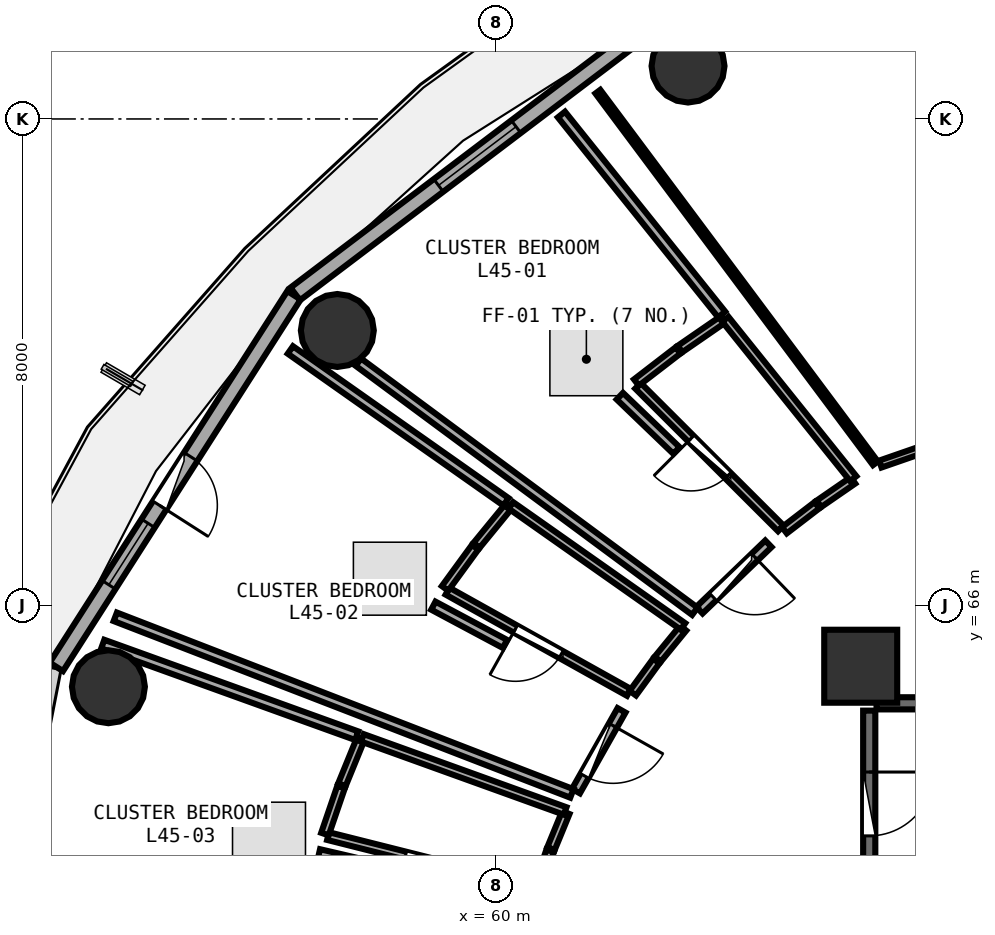
"""IFC4 building model, lengths in metres.
Left out: names, types, materials, properties, quantities, classifications, styles, units other than length and angle.
Written with IfcOpenShell. Run it as: python <this file> out.ifc"""

import sys

from ifc_helpers import new_model, si_unit, direction, frame, frame_2d, origin, origin_2d, place, context, subcontext, project, spatial, rectangle, circle, extrude, element, fill, save


model = new_model("IFC4")
c1 = context("Model", 3, precision=1e-05, world=origin(), true_north=direction((0.0, 1.0)))
c2 = subcontext(c1, "Body", "Model", "MODEL_VIEW")
j1 = project(units=[si_unit("LENGTHUNIT", "METRE"), si_unit("PLANEANGLEUNIT", "RADIAN")], contexts=[c1])
p1 = place(None, origin())
s1 = spatial("IfcSite", under=j1, at=p1, CompositionType="ELEMENT")
p2 = place(p1, origin())
s2 = spatial("IfcBuilding", under=s1, at=p2, CompositionType="ELEMENT")
p3 = place(p2, frame((0.0, 0.0, 176.85)))
s3 = spatial("IfcBuildingStorey", under=s2, at=p3, CompositionType="ELEMENT", Elevation=176.85)
p4 = place(p3, frame((66.0, 65.0, 0.0), z_axis=(0.0, 0.0, 1.0), x_axis=(1.0, 0.0, 0.0)))
e1 = element("IfcColumn", 1, at=p4, inside=s3, PredefinedType="PILASTER", context=c2, shape_type="SweptSolid", body=[
    extrude(rectangle(XDim=1.2, YDim=1.2, at=origin_2d()), origin(), (0.0, 0.0, 1.0), 3.75),
])
for number, where, z_axis, x_axis in (
    (2, (63.16, 74.87, 0.0), (0.0, 0.0, 1.0), (1.0, 0.0, 0.0)),
    (3, (57.392, 70.521, 0.0), (0.0, 0.0, 1.0), (1.0, 0.0, 0.0)),
    (4, (53.627, 64.663, 0.0), (0.0, 0.0, 1.0), (1.0, 0.0, 0.0)),
):
    element("IfcColumn", number, at=place(p3, frame(where, z_axis=z_axis, x_axis=x_axis)), inside=s3, PredefinedType="COLUMN", context=c2, shape_type="SweptSolid", body=[
        extrude(circle(Radius=0.6, at=origin_2d()), origin(), (0.0, 0.0, 1.0), 3.75),
    ])
p5 = place(p3, frame((62.688, 75.658, 0.0), z_axis=(0.0, 0.0, 1.0), x_axis=(-0.797163719609, -0.603763202042, 0.0)))
e5 = element("IfcWall", 5, at=p5, inside=s3, PredefinedType="SOLIDWALL", context=c2, shape_type="SweptSolid", body=[
    extrude(rectangle(XDim=7.512, YDim=0.26, at=frame_2d((3.756, 0.0))), origin(), (0.0, 0.0, 1.0), 3.475),
])
p6 = place(p5, frame((2.956, 0.0, 0.85)))
e6 = element("IfcOpeningElement", 6, at=p6, cuts=e5, PredefinedType="OPENING", context=c2, shape_type="SweptSolid", body=[
    extrude(rectangle(XDim=1.6, YDim=1.45, at=frame_2d((0.8, 0.725))), frame((0.0, 0.14, 0.0), z_axis=(0.0, -1.0, 0.0), x_axis=(1.0, 0.0, 0.0)), (0.0, 0.0, 1.0), 0.28),
])
p7 = place(p3, frame((56.679, 71.1, 0.0), z_axis=(0.0, 0.0, 1.0), x_axis=(-0.538801521808, -0.842432739213, 0.0)))
e7 = element("IfcWall", 7, at=p7, inside=s3, PredefinedType="SOLIDWALL", context=c2, shape_type="SweptSolid", body=[
    extrude(rectangle(XDim=7.253, YDim=0.26, at=frame_2d((3.627, 0.0))), origin(), (0.0, 0.0, 1.0), 3.475),
])
p8 = place(p7, frame((3.152, 0.0, 0.0)))
e8 = element("IfcOpeningElement", 8, at=p8, cuts=e7, PredefinedType="OPENING", context=c2, shape_type="SweptSolid", body=[
    extrude(rectangle(XDim=0.95, YDim=2.1, at=frame_2d((0.475, 1.05))), frame((0.0, 0.14, 0.0), z_axis=(0.0, -1.0, 0.0), x_axis=(1.0, 0.0, 0.0)), (0.0, 0.0, 1.0), 0.28),
])
p9 = place(p7, frame((4.452, 0.0, 0.85)))
e9 = element("IfcOpeningElement", 9, at=p9, cuts=e7, PredefinedType="OPENING", context=c2, shape_type="SweptSolid", body=[
    extrude(rectangle(XDim=1.2, YDim=1.45, at=frame_2d((0.6, 0.725))), frame((0.0, 0.14, 0.0), z_axis=(0.0, -1.0, 0.0), x_axis=(1.0, 0.0, 0.0)), (0.0, 0.0, 1.0), 0.28),
])
p10 = place(p3, frame((73.42, 64.39, 0.0), z_axis=(0.0, 0.0, 1.0), x_axis=(-1.0, 0.0, 0.0)))
e10 = element("IfcWall", 10, at=p10, inside=s3, PredefinedType="SHEAR", context=c2, shape_type="SweptSolid", body=[
    extrude(rectangle(XDim=7.16, YDim=0.2, at=frame_2d((3.58, 0.0))), origin(), (0.0, 0.0, 1.0), 3.49),
])
p11 = place(p3, frame((66.14, 64.27, 0.0), z_axis=(0.0, 0.0, 1.0), x_axis=(0.0, -1.0, 0.0)))
e11 = element("IfcWall", 11, at=p11, inside=s3, PredefinedType="SHEAR", context=c2, shape_type="SweptSolid", body=[
    extrude(rectangle(XDim=3.07, YDim=0.2, at=frame_2d((1.535, 0.0))), origin(), (0.0, 0.0, 1.0), 3.49),
])
p12 = place(p11, frame((1.01, 0.0, 0.0)))
e12 = element("IfcOpeningElement", 12, at=p12, cuts=e11, PredefinedType="OPENING", context=c2, shape_type="SweptSolid", body=[
    extrude(rectangle(XDim=1.05, YDim=2.1, at=frame_2d((0.525, 1.05))), frame((0.0, 0.11, 0.0), z_axis=(0.0, -1.0, 0.0), x_axis=(1.0, 0.0, 0.0)), (0.0, 0.0, 1.0), 0.22),
])
p13 = place(p3, frame((71.958, 70.281, 0.0), z_axis=(0.0, 0.0, 1.0), x_axis=(-0.944685464341, -0.327977702692, 0.0)))
e13 = element("IfcWall", 13, at=p13, inside=s3, PredefinedType="PARTITIONING", context=c2, shape_type="SweptSolid", body=[
    extrude(rectangle(XDim=5.966, YDim=0.12, at=frame_2d((2.983, 0.0))), origin(), (0.0, 0.0, 1.0), 2.975),
])
p14 = place(p13, frame((2.533, 0.0, 0.0)))
e14 = element("IfcOpeningElement", 14, at=p14, cuts=e13, PredefinedType="OPENING", context=c2, shape_type="SweptSolid", body=[
    extrude(rectangle(XDim=0.9, YDim=2.08, at=frame_2d((0.45, 1.04))), frame((0.0, 0.07, 0.0), z_axis=(0.0, -1.0, 0.0), x_axis=(1.0, 0.0, 0.0)), (0.0, 0.0, 1.0), 0.14),
])
p15 = place(p3, frame((64.687, 67.266, 0.0), z_axis=(0.0, 0.0, 1.0), x_axis=(-0.707694933746, 0.706518139011, 0.0)))
e15 = element("IfcWall", 15, at=p15, inside=s3, PredefinedType="PLUMBINGWALL", context=c2, shape_type="SweptSolid", body=[
    extrude(rectangle(XDim=3.319, YDim=0.13, at=frame_2d((1.66, 0.0))), origin(), (0.0, 0.0, 1.0), 3.175),
])
p16 = place(p15, frame((1.23, 0.0, 0.0)))
e16 = element("IfcOpeningElement", 16, at=p16, cuts=e15, PredefinedType="OPENING", context=c2, shape_type="SweptSolid", body=[
    extrude(rectangle(XDim=0.86, YDim=2.05, at=frame_2d((0.43, 1.025))), frame((0.0, 0.075, 0.0), z_axis=(0.0, -1.0, 0.0), x_axis=(1.0, 0.0, 0.0)), (0.0, 0.0, 1.0), 0.15),
])
p17 = place(p3, frame((64.482, 67.013, 0.0), z_axis=(0.0, 0.0, 1.0), x_axis=(-0.720543985977, -0.693409232901, 0.0)))
e17 = element("IfcWall", 17, at=p17, inside=s3, PredefinedType="PARTITIONING", context=c2, shape_type="SweptSolid", body=[
    extrude(rectangle(XDim=1.574, YDim=0.15, at=frame_2d((0.787, 0.0))), origin(), (0.0, 0.0, 1.0), 2.975),
])
p18 = place(p17, frame((0.312, 0.0, 0.0)))
e18 = element("IfcOpeningElement", 18, at=p18, cuts=e17, PredefinedType="OPENING", context=c2, shape_type="SweptSolid", body=[
    extrude(rectangle(XDim=0.95, YDim=2.08, at=frame_2d((0.475, 1.04))), frame((0.0, 0.085, 0.0), z_axis=(0.0, -1.0, 0.0), x_axis=(1.0, 0.0, 0.0)), (0.0, 0.0, 1.0), 0.17),
])
p19 = place(p3, frame((62.188, 64.57, 0.0), z_axis=(0.0, 0.0, 1.0), x_axis=(-0.873255694646, 0.487262241271, 0.0)))
e19 = element("IfcWall", 19, at=p19, inside=s3, PredefinedType="PLUMBINGWALL", context=c2, shape_type="SweptSolid", body=[
    extrude(rectangle(XDim=3.416, YDim=0.13, at=frame_2d((1.708, 0.0))), origin(), (0.0, 0.0, 1.0), 2.975),
])
p20 = place(p19, frame((1.278, 0.0, 0.0)))
e20 = element("IfcOpeningElement", 20, at=p20, cuts=e19, PredefinedType="OPENING", context=c2, shape_type="SweptSolid", body=[
    extrude(rectangle(XDim=0.86, YDim=2.05, at=frame_2d((0.43, 1.025))), frame((0.0, 0.075, 0.0), z_axis=(0.0, -1.0, 0.0), x_axis=(1.0, 0.0, 0.0)), (0.0, 0.0, 1.0), 0.15),
])
p21 = place(p3, frame((62.066, 64.275, 0.0), z_axis=(0.0, 0.0, 1.0), x_axis=(-0.491582624537, -0.870830938388, 0.0)))
e21 = element("IfcWall", 21, at=p21, inside=s3, PredefinedType="PARTITIONING", context=c2, shape_type="SweptSolid", body=[
    extrude(rectangle(XDim=1.526, YDim=0.15, at=frame_2d((0.763, 0.0))), origin(), (0.0, 0.0, 1.0), 3.235),
])
p22 = place(p21, frame((0.288, 0.0, 0.0)))
e22 = element("IfcOpeningElement", 22, at=p22, cuts=e21, PredefinedType="OPENING", context=c2, shape_type="SweptSolid", body=[
    extrude(rectangle(XDim=0.95, YDim=2.08, at=frame_2d((0.475, 1.04))), frame((0.0, 0.085, 0.0), z_axis=(0.0, -1.0, 0.0), x_axis=(1.0, 0.0, 0.0)), (0.0, 0.0, 1.0), 0.17),
])
p23 = place(p3, frame((60.621, 61.356, 0.0), z_axis=(0.0, 0.0, 1.0), x_axis=(-0.969774737706, 0.244001963326, 0.0)))
e23 = element("IfcWall", 23, at=p23, inside=s3, PredefinedType="PLUMBINGWALL", context=c2, shape_type="SweptSolid", body=[
    extrude(rectangle(XDim=3.486, YDim=0.13, at=frame_2d((1.743, 0.0))), origin(), (0.0, 0.0, 1.0), 3.175),
])
p24 = place(p23, frame((1.313, 0.0, 0.0)))
e24 = element("IfcOpeningElement", 24, at=p24, cuts=e23, PredefinedType="OPENING", context=c2, shape_type="SweptSolid", body=[
    extrude(rectangle(XDim=0.86, YDim=2.05, at=frame_2d((0.43, 1.025))), frame((0.0, 0.075, 0.0), z_axis=(0.0, -1.0, 0.0), x_axis=(1.0, 0.0, 0.0)), (0.0, 0.0, 1.0), 0.15),
])
p25 = place(p3, frame((66.242, 68.337, 0.0), z_axis=(0.0, 0.0, 1.0), x_axis=(-0.598416617992, 0.801185091793, 0.0)))
e25 = element("IfcWall", 25, at=p25, inside=s3, PredefinedType="PARTITIONING", context=c2, shape_type="SweptSolid", body=[
    extrude(rectangle(XDim=7.629, YDim=0.1, at=frame_2d((3.814, 0.0))), origin(), (0.0, 0.0, 1.0), 2.975),
])
p26 = place(p3, frame((65.874, 68.058, 0.0), z_axis=(0.0, 0.0, 1.0), x_axis=(-0.823224352539, -0.567716183834, 0.0)))
e26 = element("IfcWall", 26, at=p26, inside=s3, PredefinedType="PLUMBINGWALL", context=c2, shape_type="SweptSolid", body=[
    extrude(rectangle(XDim=0.68, YDim=0.13, at=frame_2d((0.34, 0.0))), origin(), (0.0, 0.0, 1.0), 2.975),
])
p27 = place(p3, frame((65.281, 67.648, 0.0), z_axis=(0.0, 0.0, 1.0), x_axis=(-0.793187600036, -0.608977365055, 0.0)))
e27 = element("IfcWall", 27, at=p27, inside=s3, PredefinedType="PLUMBINGWALL", context=c2, shape_type="SweptSolid", body=[
    extrude(rectangle(XDim=0.676, YDim=0.13, at=frame_2d((0.338, 0.0))), origin(), (0.0, 0.0, 1.0), 2.975),
])
p28 = place(p3, frame((62.311, 69.666, 0.0), z_axis=(0.0, 0.0, 1.0), x_axis=(0.792382565467, 0.610024483069, 0.0)))
e28 = element("IfcWall", 28, at=p28, inside=s3, PredefinedType="PLUMBINGWALL", context=c2, shape_type="SweptSolid", body=[
    extrude(rectangle(XDim=0.865, YDim=0.13, at=frame_2d((0.432, 0.0))), origin(), (0.0, 0.0, 1.0), 3.48),
])
p29 = place(p3, frame((63.029, 70.217, 0.0), z_axis=(0.0, 0.0, 1.0), x_axis=(0.823353055732, 0.567529510789, 0.0)))
e29 = element("IfcWall", 29, at=p29, inside=s3, PredefinedType="PLUMBINGWALL", context=c2, shape_type="SweptSolid", body=[
    extrude(rectangle(XDim=0.869, YDim=0.13, at=frame_2d((0.435, 0.0))), origin(), (0.0, 0.0, 1.0), 3.175),
])
p30 = place(p3, frame((63.773, 70.706, 0.0), z_axis=(0.0, 0.0, 1.0), x_axis=(0.625916574892, -0.779890018704, 0.0)))
e30 = element("IfcWall", 30, at=p30, inside=s3, PredefinedType="PLUMBINGWALL", context=c2, shape_type="SweptSolid", body=[
    extrude(rectangle(XDim=3.362, YDim=0.13, at=frame_2d((1.681, 0.0))), origin(), (0.0, 0.0, 1.0), 2.975),
])
p31 = place(p3, frame((63.272, 65.904, 0.0), z_axis=(0.0, 0.0, 1.0), x_axis=(-0.803728632682, 0.594996037808, 0.0)))
e31 = element("IfcWall", 31, at=p31, inside=s3, PredefinedType="PARTITIONING", context=c2, shape_type="SweptSolid", body=[
    extrude(rectangle(XDim=6.886, YDim=0.15, at=frame_2d((3.443, 0.0))), origin(), (0.0, 0.0, 1.0), 3.175),
])
p32 = place(p3, frame((61.078, 74.073, 0.0), z_axis=(0.0, 0.0, 1.0), x_axis=(0.62540850869, -0.780297505608, 0.0)))
e32 = element("IfcWall", 32, at=p32, inside=s3, PredefinedType="PARTITIONING", context=c2, shape_type="SweptSolid", body=[
    extrude(rectangle(XDim=4.213, YDim=0.15, at=frame_2d((2.107, 0.0))), origin(), (0.0, 0.0, 1.0), 3.025),
])
p33 = place(p3, frame((62.039, 69.441, 0.0), z_axis=(0.0, 0.0, 1.0), x_axis=(0.721428898705, -0.692488515511, 0.0)))
e33 = element("IfcWall", 33, at=p33, inside=s3, PredefinedType="PARTITIONING", context=c2, shape_type="SweptSolid", body=[
    extrude(rectangle(XDim=1.291, YDim=0.15, at=frame_2d((0.646, 0.0))), origin(), (0.0, 0.0, 1.0), 3.175),
])
p34 = place(p3, frame((63.08, 65.627, 0.0), z_axis=(0.0, 0.0, 1.0), x_axis=(-0.633641038052, -0.773627193741, 0.0)))
e34 = element("IfcWall", 34, at=p34, inside=s3, PredefinedType="PLUMBINGWALL", context=c2, shape_type="SweptSolid", body=[
    extrude(rectangle(XDim=0.659, YDim=0.13, at=frame_2d((0.33, 0.0))), origin(), (0.0, 0.0, 1.0), 3.48),
])
p35 = place(p3, frame((62.638, 65.086, 0.0), z_axis=(0.0, 0.0, 1.0), x_axis=(-0.590053970957, -0.807363803596, 0.0)))
e35 = element("IfcWall", 35, at=p35, inside=s3, PredefinedType="PLUMBINGWALL", context=c2, shape_type="SweptSolid", body=[
    extrude(rectangle(XDim=0.655, YDim=0.13, at=frame_2d((0.328, 0.0))), origin(), (0.0, 0.0, 1.0), 2.975),
])
p36 = place(p3, frame((59.164, 66.28, 0.0), z_axis=(0.0, 0.0, 1.0), x_axis=(0.589885116714, 0.807487181991, 0.0)))
e36 = element("IfcWall", 36, at=p36, inside=s3, PredefinedType="PLUMBINGWALL", context=c2, shape_type="SweptSolid", body=[
    extrude(rectangle(XDim=0.838, YDim=0.13, at=frame_2d((0.419, 0.0))), origin(), (0.0, 0.0, 1.0), 3.48),
])
p37 = place(p3, frame((59.683, 66.989, 0.0), z_axis=(0.0, 0.0, 1.0), x_axis=(0.633474035481, 0.773763947449, 0.0)))
e37 = element("IfcWall", 37, at=p37, inside=s3, PredefinedType="PLUMBINGWALL", context=c2, shape_type="SweptSolid", body=[
    extrude(rectangle(XDim=0.844, YDim=0.13, at=frame_2d((0.422, 0.0))), origin(), (0.0, 0.0, 1.0), 3.175),
])
p38 = place(p3, frame((60.246, 67.646, 0.0), z_axis=(0.0, 0.0, 1.0), x_axis=(0.817907250539, -0.575350093, 0.0)))
e38 = element("IfcWall", 38, at=p38, inside=s3, PredefinedType="PLUMBINGWALL", context=c2, shape_type="SweptSolid", body=[
    extrude(rectangle(XDim=3.46, YDim=0.13, at=frame_2d((1.73, 0.0))), origin(), (0.0, 0.0, 1.0), 3.175),
])
p39 = place(p3, frame((61.25, 62.908, 0.0), z_axis=(0.0, 0.0, 1.0), x_axis=(-0.932687580633, 0.360685287936, 0.0)))
e39 = element("IfcWall", 39, at=p39, inside=s3, PredefinedType="PARTITIONING", context=c2, shape_type="SweptSolid", body=[
    extrude(rectangle(XDim=8.052, YDim=0.15, at=frame_2d((4.026, 0.0))), origin(), (0.0, 0.0, 1.0), 2.975),
])
p40 = place(p3, frame((56.62, 70.201, 0.0), z_axis=(0.0, 0.0, 1.0), x_axis=(0.817617957458, -0.575761127241, 0.0)))
e40 = element("IfcWall", 40, at=p40, inside=s3, PredefinedType="PARTITIONING", context=c2, shape_type="SweptSolid", body=[
    extrude(rectangle(XDim=4.337, YDim=0.15, at=frame_2d((2.168, 0.0))), origin(), (0.0, 0.0, 1.0), 3.025),
])
p41 = place(p3, frame((58.971, 65.996, 0.0), z_axis=(0.0, 0.0, 1.0), x_axis=(0.882039066957, -0.471176277376, 0.0)))
e41 = element("IfcWall", 41, at=p41, inside=s3, PredefinedType="PARTITIONING", context=c2, shape_type="SweptSolid", body=[
    extrude(rectangle(XDim=1.336, YDim=0.15, at=frame_2d((0.668, 0.0))), origin(), (0.0, 0.0, 1.0), 3.175),
])
p42 = place(p3, frame((61.15, 62.594, 0.0), z_axis=(0.0, 0.0, 1.0), x_axis=(-0.38036677213, -0.924835725229, 0.0)))
e42 = element("IfcWall", 42, at=p42, inside=s3, PredefinedType="PLUMBINGWALL", context=c2, shape_type="SweptSolid", body=[
    extrude(rectangle(XDim=0.641, YDim=0.13, at=frame_2d((0.321, 0.0))), origin(), (0.0, 0.0, 1.0), 3.235),
])
p43 = place(p3, frame((60.893, 61.964, 0.0), z_axis=(0.0, 0.0, 1.0), x_axis=(-0.324128876048, -0.94601293422, 0.0)))
e43 = element("IfcWall", 43, at=p43, inside=s3, PredefinedType="PLUMBINGWALL", context=c2, shape_type="SweptSolid", body=[
    extrude(rectangle(XDim=0.639, YDim=0.13, at=frame_2d((0.319, 0.0))), origin(), (0.0, 0.0, 1.0), 3.48),
])
p44 = place(p3, frame((57.188, 62.24, 0.0), z_axis=(0.0, 0.0, 1.0), x_axis=(0.324370140969, 0.945930236142, 0.0)))
e44 = element("IfcWall", 44, at=p44, inside=s3, PredefinedType="PLUMBINGWALL", context=c2, shape_type="SweptSolid", body=[
    extrude(rectangle(XDim=0.817, YDim=0.13, at=frame_2d((0.409, 0.0))), origin(), (0.0, 0.0, 1.0), 3.48),
])
p45 = place(p3, frame((57.468, 63.051, 0.0), z_axis=(0.0, 0.0, 1.0), x_axis=(0.378505488692, 0.92559904658, 0.0)))
e45 = element("IfcWall", 45, at=p45, inside=s3, PredefinedType="PLUMBINGWALL", context=c2, shape_type="SweptSolid", body=[
    extrude(rectangle(XDim=0.821, YDim=0.13, at=frame_2d((0.411, 0.0))), origin(), (0.0, 0.0, 1.0), 3.48),
])
p46 = place(p3, frame((57.805, 63.822, 0.0), z_axis=(0.0, 0.0, 1.0), x_axis=(0.940709042882, -0.339214528935, 0.0)))
e46 = element("IfcWall", 46, at=p46, inside=s3, PredefinedType="PLUMBINGWALL", context=c2, shape_type="SweptSolid", body=[
    extrude(rectangle(XDim=3.545, YDim=0.13, at=frame_2d((1.772, 0.0))), origin(), (0.0, 0.0, 1.0), 3.175),
])
p47 = place(p3, frame((53.535, 65.365, 0.0), z_axis=(0.0, 0.0, 1.0), x_axis=(0.940657292565, -0.339358008517, 0.0)))
e47 = element("IfcWall", 47, at=p47, inside=s3, PredefinedType="PARTITIONING", context=c2, shape_type="SweptSolid", body=[
    extrude(rectangle(XDim=4.44, YDim=0.15, at=frame_2d((2.22, 0.0))), origin(), (0.0, 0.0, 1.0), 2.975),
])
p48 = place(p3, frame((57.091, 61.918, 0.0), z_axis=(0.0, 0.0, 1.0), x_axis=(0.973980333704, -0.226632543023, 0.0)))
e48 = element("IfcWall", 48, at=p48, inside=s3, PredefinedType="PARTITIONING", context=c2, shape_type="SweptSolid", body=[
    extrude(rectangle(XDim=1.357, YDim=0.15, at=frame_2d((0.679, 0.0))), origin(), (0.0, 0.0, 1.0), 3.175),
])
p49 = place(p6, origin())
e49 = element("IfcWindow", 49, at=p49, inside=s3, PartitioningType="SINGLE_PANEL", PredefinedType="WINDOW", context=c2, shape_type="SweptSolid", body=[
    extrude(rectangle(XDim=1.6, YDim=1.45, at=frame_2d((0.8, 0.725))), frame((0.0, 0.03, 0.0), z_axis=(0.0, -1.0, 0.0), x_axis=(1.0, 0.0, 0.0)), (0.0, 0.0, 1.0), 0.06),
])
fill(e6, e49)
p50 = place(p8, frame((0.95, 0.0, 0.0), z_axis=(0.0, 0.0, 1.0), x_axis=(-1.0, 0.0, 0.0)))
e50 = element("IfcDoor", 50, at=p50, inside=s3, OperationType="SINGLE_SWING_LEFT", PredefinedType="DOOR", context=c2, shape_type="SweptSolid", body=[
    extrude(rectangle(XDim=0.95, YDim=2.1, at=frame_2d((0.475, 1.05))), frame((0.0, 0.025, 0.0), z_axis=(0.0, -1.0, 0.0), x_axis=(1.0, 0.0, 0.0)), (0.0, 0.0, 1.0), 0.05),
])
fill(e8, e50)
p51 = place(p9, origin())
e51 = element("IfcWindow", 51, at=p51, inside=s3, PartitioningType="SINGLE_PANEL", PredefinedType="WINDOW", context=c2, shape_type="SweptSolid", body=[
    extrude(rectangle(XDim=1.2, YDim=1.45, at=frame_2d((0.6, 0.725))), frame((0.0, 0.03, 0.0), z_axis=(0.0, -1.0, 0.0), x_axis=(1.0, 0.0, 0.0)), (0.0, 0.0, 1.0), 0.06),
])
fill(e9, e51)
p52 = place(p12, origin())
e52 = element("IfcDoor", 52, at=p52, inside=s3, OperationType="SINGLE_SWING_LEFT", PredefinedType="DOOR", context=c2, shape_type="SweptSolid", body=[
    extrude(rectangle(XDim=1.05, YDim=2.1, at=frame_2d((0.525, 1.05))), frame((0.0, 0.025, 0.0), z_axis=(0.0, -1.0, 0.0), x_axis=(1.0, 0.0, 0.0)), (0.0, 0.0, 1.0), 0.05),
])
fill(e12, e52)
p53 = place(p16, origin())
e53 = element("IfcDoor", 53, at=p53, inside=s3, OperationType="SINGLE_SWING_RIGHT", PredefinedType="DOOR", context=c2, shape_type="SweptSolid", body=[
    extrude(rectangle(XDim=0.86, YDim=2.05, at=frame_2d((0.43, 1.025))), frame((0.0, 0.025, 0.0), z_axis=(0.0, -1.0, 0.0), x_axis=(1.0, 0.0, 0.0)), (0.0, 0.0, 1.0), 0.05),
])
fill(e16, e53)
p54 = place(p18, origin())
e54 = element("IfcDoor", 54, at=p54, inside=s3, OperationType="SINGLE_SWING_LEFT", PredefinedType="DOOR", context=c2, shape_type="SweptSolid", body=[
    extrude(rectangle(XDim=0.95, YDim=2.08, at=frame_2d((0.475, 1.04))), frame((0.0, 0.025, 0.0), z_axis=(0.0, -1.0, 0.0), x_axis=(1.0, 0.0, 0.0)), (0.0, 0.0, 1.0), 0.05),
])
fill(e18, e54)
p55 = place(p20, origin())
e55 = element("IfcDoor", 55, at=p55, inside=s3, OperationType="SINGLE_SWING_RIGHT", PredefinedType="DOOR", context=c2, shape_type="SweptSolid", body=[
    extrude(rectangle(XDim=0.86, YDim=2.05, at=frame_2d((0.43, 1.025))), frame((0.0, 0.025, 0.0), z_axis=(0.0, -1.0, 0.0), x_axis=(1.0, 0.0, 0.0)), (0.0, 0.0, 1.0), 0.05),
])
fill(e20, e55)
p56 = place(p22, origin())
e56 = element("IfcDoor", 56, at=p56, inside=s3, OperationType="SINGLE_SWING_LEFT", PredefinedType="DOOR", context=c2, shape_type="SweptSolid", body=[
    extrude(rectangle(XDim=0.95, YDim=2.08, at=frame_2d((0.475, 1.04))), frame((0.0, 0.025, 0.0), z_axis=(0.0, -1.0, 0.0), x_axis=(1.0, 0.0, 0.0)), (0.0, 0.0, 1.0), 0.05),
])
fill(e22, e56)
p57 = place(p24, origin())
e57 = element("IfcDoor", 57, at=p57, inside=s3, OperationType="SINGLE_SWING_RIGHT", PredefinedType="DOOR", context=c2, shape_type="SweptSolid", body=[
    extrude(rectangle(XDim=0.86, YDim=2.05, at=frame_2d((0.43, 1.025))), frame((0.0, 0.025, 0.0), z_axis=(0.0, -1.0, 0.0), x_axis=(1.0, 0.0, 0.0)), (0.0, 0.0, 1.0), 0.05),
])
fill(e24, e57)
save(model, sys.argv[1])
